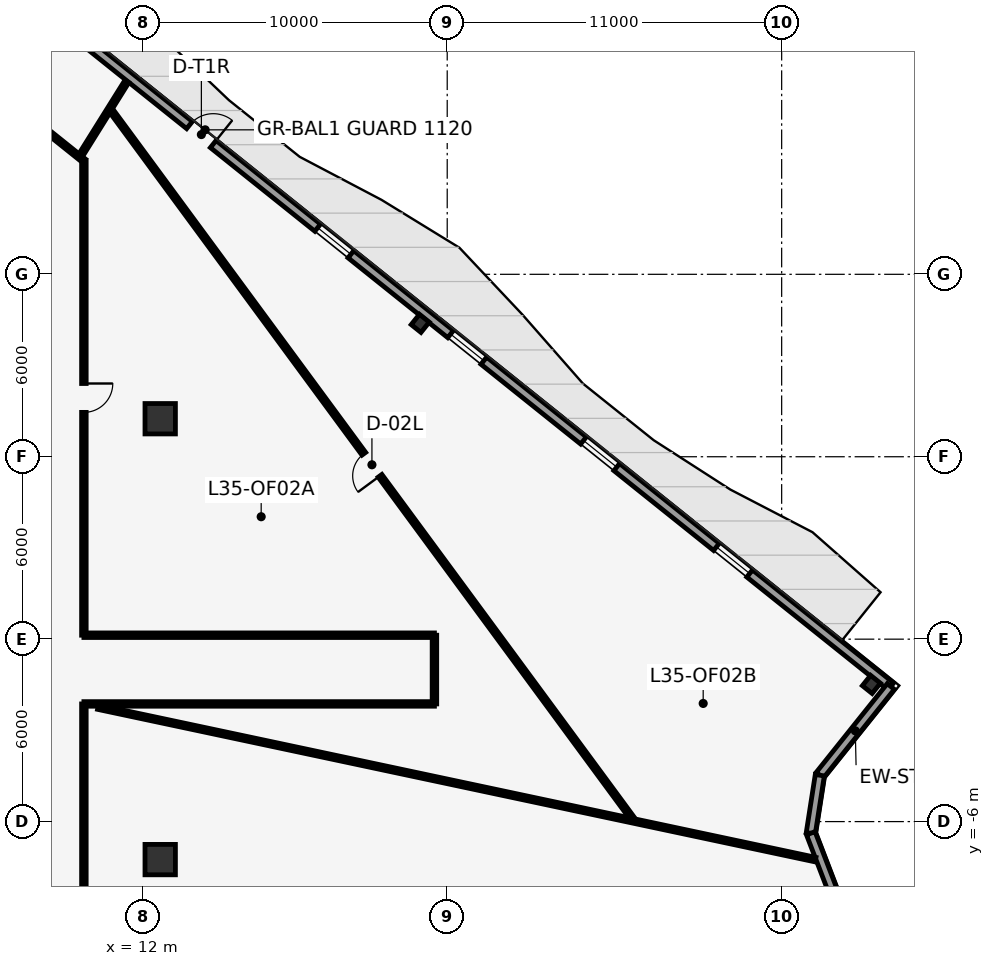
"""IFC4 building model, lengths in metres.
Left out: names, types, materials, properties, quantities, classifications, styles, units other than length and angle.
Written with IfcOpenShell. Run it as: python <this file> out.ifc"""

import sys

from ifc_helpers import new_model, si_unit, direction, frame, frame_2d, origin, origin_2d, place, context, subcontext, project, spatial, rectangle, i_section, extrude, element, fill, save


model = new_model("IFC4")
c1 = context("Model", 3, precision=1e-05, world=origin(), true_north=direction((0.0, 1.0)))
c2 = subcontext(c1, "Body", "Model", "MODEL_VIEW")
j1 = project(units=[si_unit("LENGTHUNIT", "METRE"), si_unit("PLANEANGLEUNIT", "RADIAN")], contexts=[c1])
p1 = place(None, origin())
s1 = spatial("IfcSite", under=j1, at=p1, CompositionType="ELEMENT")
p2 = place(p1, origin())
s2 = spatial("IfcBuilding", under=s1, at=p2, CompositionType="ELEMENT")
p3 = place(p2, frame((0.0, 0.0, 152.7)))
s3 = spatial("IfcBuildingStorey", under=s2, at=p3, CompositionType="ELEMENT", Elevation=152.7)
for number, where, z_axis, x_axis in (
    (1, (12.56, -7.25, 0.0), (0.0, 0.0, 1.0), (1.0, 0.0, 0.0)),
    (2, (12.56, 7.25, 0.0), (0.0, 0.0, 1.0), (1.0, 0.0, 0.0)),
):
    element("IfcColumn", number, at=place(p3, frame(where, z_axis=z_axis, x_axis=x_axis)), inside=s3, PredefinedType="COLUMN", context=c2, shape_type="SweptSolid", body=[
        extrude(rectangle(XDim=1.0, YDim=1.0, at=origin_2d()), origin(), (0.0, 0.0, 1.0), 4.1),
    ])
for number, where, z_axis, x_axis in (
    (3, (35.951, -1.489, 0.0), (0.0, 0.0, 1.0), (-0.781, 0.625, 0.0)),
    (4, (21.112, 10.387, 0.0), (0.0, 0.0, 1.0), (-0.781, 0.625, 0.0)),
):
    element("IfcColumn", number, at=place(p3, frame(where, z_axis=z_axis, x_axis=x_axis)), inside=s3, PredefinedType="COLUMN", context=c2, shape_type="SweptSolid", body=[
        extrude(i_section(OverallWidth=0.411, OverallDepth=0.434, WebThickness=0.036, FlangeThickness=0.057, at=origin_2d()), origin(), (0.0, 0.0, 1.0), 4.1),
    ])
p4 = place(p3, frame((-8.762, 34.748, 0.0), z_axis=(0.0, 0.0, 1.0), x_axis=(0.780669916438, -0.624943582708, 0.0)))
e5 = element("IfcWall", 5, at=p4, inside=s3, PredefinedType="STANDARD", context=c2, shape_type="SweptSolid", body=[
    extrude(rectangle(XDim=58.093, YDim=0.3, at=frame_2d((29.046, 0.0))), origin(), (0.0, 0.0, 1.0), 3.85),
])
p5 = place(p4, frame((28.547, 0.0, 0.0)))
e6 = element("IfcOpeningElement", 6, at=p5, cuts=e5, PredefinedType="OPENING", context=c2, shape_type="SweptSolid", body=[
    extrude(rectangle(XDim=1.0, YDim=2.15, at=frame_2d((0.5, 1.075))), frame((0.0, 0.16, 0.0), z_axis=(0.0, -1.0, 0.0), x_axis=(1.0, 0.0, 0.0)), (0.0, 0.0, 1.0), 0.32),
])
p6 = place(p4, frame((5.947, 0.0, 0.85)))
e7 = element("IfcOpeningElement", 7, at=p6, cuts=e5, PredefinedType="OPENING", context=c2, shape_type="SweptSolid", body=[
    extrude(rectangle(XDim=1.4, YDim=2.2, at=frame_2d((0.7, 1.1))), frame((0.0, 0.16, 0.0), z_axis=(0.0, -1.0, 0.0), x_axis=(1.0, 0.0, 0.0)), (0.0, 0.0, 1.0), 0.32),
])
p7 = place(p4, frame((11.547, 0.0, 0.85)))
e8 = element("IfcOpeningElement", 8, at=p7, cuts=e5, PredefinedType="OPENING", context=c2, shape_type="SweptSolid", body=[
    extrude(rectangle(XDim=1.4, YDim=2.2, at=frame_2d((0.7, 1.1))), frame((0.0, 0.16, 0.0), z_axis=(0.0, -1.0, 0.0), x_axis=(1.0, 0.0, 0.0)), (0.0, 0.0, 1.0), 0.32),
])
p8 = place(p4, frame((17.146, 0.0, 0.85)))
e9 = element("IfcOpeningElement", 9, at=p8, cuts=e5, PredefinedType="OPENING", context=c2, shape_type="SweptSolid", body=[
    extrude(rectangle(XDim=1.4, YDim=2.2, at=frame_2d((0.7, 1.1))), frame((0.0, 0.16, 0.0), z_axis=(0.0, -1.0, 0.0), x_axis=(1.0, 0.0, 0.0)), (0.0, 0.0, 1.0), 0.32),
])
p9 = place(p4, frame((22.747, 0.0, 0.85)))
e10 = element("IfcOpeningElement", 10, at=p9, cuts=e5, PredefinedType="OPENING", context=c2, shape_type="SweptSolid", body=[
    extrude(rectangle(XDim=1.4, YDim=2.2, at=frame_2d((0.7, 1.1))), frame((0.0, 0.16, 0.0), z_axis=(0.0, -1.0, 0.0), x_axis=(1.0, 0.0, 0.0)), (0.0, 0.0, 1.0), 0.32),
])
p10 = place(p4, frame((33.947, 0.0, 0.85)))
e11 = element("IfcOpeningElement", 11, at=p10, cuts=e5, PredefinedType="OPENING", context=c2, shape_type="SweptSolid", body=[
    extrude(rectangle(XDim=1.4, YDim=2.2, at=frame_2d((0.7, 1.1))), frame((0.0, 0.16, 0.0), z_axis=(0.0, -1.0, 0.0), x_axis=(1.0, 0.0, 0.0)), (0.0, 0.0, 1.0), 0.32),
])
p11 = place(p4, frame((39.547, 0.0, 0.85)))
e12 = element("IfcOpeningElement", 12, at=p11, cuts=e5, PredefinedType="OPENING", context=c2, shape_type="SweptSolid", body=[
    extrude(rectangle(XDim=1.4, YDim=2.2, at=frame_2d((0.7, 1.1))), frame((0.0, 0.16, 0.0), z_axis=(0.0, -1.0, 0.0), x_axis=(1.0, 0.0, 0.0)), (0.0, 0.0, 1.0), 0.32),
])
p12 = place(p4, frame((45.146, 0.0, 0.85)))
e13 = element("IfcOpeningElement", 13, at=p12, cuts=e5, PredefinedType="OPENING", context=c2, shape_type="SweptSolid", body=[
    extrude(rectangle(XDim=1.4, YDim=2.2, at=frame_2d((0.7, 1.1))), frame((0.0, 0.16, 0.0), z_axis=(0.0, -1.0, 0.0), x_axis=(1.0, 0.0, 0.0)), (0.0, 0.0, 1.0), 0.32),
])
p13 = place(p4, frame((50.747, 0.0, 0.85)))
e14 = element("IfcOpeningElement", 14, at=p13, cuts=e5, PredefinedType="OPENING", context=c2, shape_type="SweptSolid", body=[
    extrude(rectangle(XDim=1.4, YDim=2.2, at=frame_2d((0.7, 1.1))), frame((0.0, 0.16, 0.0), z_axis=(0.0, -1.0, 0.0), x_axis=(1.0, 0.0, 0.0)), (0.0, 0.0, 1.0), 0.32),
])
p14 = place(p3, frame((36.59, -1.557, 0.0), z_axis=(0.0, 0.0, 1.0), x_axis=(-0.62493402561, -0.780677567012, 0.0)))
e15 = element("IfcWall", 15, at=p14, inside=s3, PredefinedType="STANDARD", context=c2, shape_type="SweptSolid", body=[
    extrude(rectangle(XDim=3.737, YDim=0.3, at=frame_2d((1.869, 0.0))), origin(), (0.0, 0.0, 1.0), 3.85),
])
p15 = place(p3, frame((34.254, -4.474, 0.0), z_axis=(0.0, 0.0, 1.0), x_axis=(-0.153717968475, -0.988114763663, 0.0)))
e16 = element("IfcWall", 16, at=p15, inside=s3, PredefinedType="STANDARD", context=c2, shape_type="SweptSolid", body=[
    extrude(rectangle(XDim=1.933, YDim=0.3, at=frame_2d((0.966, 0.0))), origin(), (0.0, 0.0, 1.0), 3.85),
])
p16 = place(p3, frame((33.957, -6.384, 0.0), z_axis=(0.0, 0.0, 1.0), x_axis=(0.358344201462, -0.933589542186, 0.0)))
e17 = element("IfcWall", 17, at=p16, inside=s3, PredefinedType="STANDARD", context=c2, shape_type="SweptSolid", body=[
    extrude(rectangle(XDim=3.737, YDim=0.3, at=frame_2d((1.869, 0.0))), origin(), (0.0, 0.0, 1.0), 3.85),
])
p17 = place(p3, frame((7.79, 17.547, 0.0), z_axis=(0.0, 0.0, 1.0), x_axis=(0.780646621428, -0.624972681366, 0.0)))
e18 = element("IfcWall", 18, at=p17, inside=s3, PredefinedType="PARTITIONING", context=c2, shape_type="SweptSolid", body=[
    extrude(rectangle(XDim=2.895, YDim=0.15, at=frame_2d((1.448, 0.0))), origin(), (0.0, 0.0, 1.0), 3.85),
])
p18 = place(p3, frame((10.05, 15.737, 0.0), z_axis=(0.0, 0.0, 1.0), x_axis=(0.0, -1.0, 0.0)))
e19 = element("IfcWall", 19, at=p18, inside=s3, PredefinedType="PARTITIONING", context=c2, shape_type="SweptSolid", body=[
    extrude(rectangle(XDim=15.607, YDim=0.15, at=frame_2d((7.804, 0.0))), origin(), (0.0, 0.0, 1.0), 3.85),
])
p19 = place(p18, frame((7.329, 0.0, 0.0)))
e20 = element("IfcOpeningElement", 20, at=p19, cuts=e19, PredefinedType="OPENING", context=c2, shape_type="SweptSolid", body=[
    extrude(rectangle(XDim=0.95, YDim=2.15, at=frame_2d((0.475, 1.075))), frame((0.0, 0.085, 0.0), z_axis=(0.0, -1.0, 0.0), x_axis=(1.0, 0.0, 0.0)), (0.0, 0.0, 1.0), 0.17),
])
p20 = place(p3, frame((10.05, 0.13, 0.0), z_axis=(0.0, 0.0, 1.0), x_axis=(1.0, 0.0, 0.0)))
e21 = element("IfcWall", 21, at=p20, inside=s3, PredefinedType="PARTITIONING", context=c2, shape_type="SweptSolid", body=[
    extrude(rectangle(XDim=11.53, YDim=0.15, at=frame_2d((5.765, 0.0))), origin(), (0.0, 0.0, 1.0), 3.85),
])
p21 = place(p3, frame((21.58, 0.13, 0.0), z_axis=(0.0, 0.0, 1.0), x_axis=(0.0, -1.0, 0.0)))
e22 = element("IfcWall", 22, at=p21, inside=s3, PredefinedType="PARTITIONING", context=c2, shape_type="SweptSolid", body=[
    extrude(rectangle(XDim=2.26, YDim=0.15, at=frame_2d((1.13, 0.0))), origin(), (0.0, 0.0, 1.0), 3.85),
])
p22 = place(p3, frame((21.58, -2.13, 0.0), z_axis=(0.0, 0.0, 1.0), x_axis=(-1.0, 0.0, 0.0)))
e23 = element("IfcWall", 23, at=p22, inside=s3, PredefinedType="PARTITIONING", context=c2, shape_type="SweptSolid", body=[
    extrude(rectangle(XDim=11.53, YDim=0.15, at=frame_2d((5.765, 0.0))), origin(), (0.0, 0.0, 1.0), 3.85),
])
p23 = place(p3, frame((10.05, -2.13, 0.0), z_axis=(0.0, 0.0, 1.0), x_axis=(0.0, -1.0, 0.0)))
e24 = element("IfcWall", 24, at=p23, inside=s3, PredefinedType="PARTITIONING", context=c2, shape_type="SweptSolid", body=[
    extrude(rectangle(XDim=14.13, YDim=0.15, at=frame_2d((7.065, 0.0))), origin(), (0.0, 0.0, 1.0), 3.85),
])
p24 = place(p23, frame((6.59, 0.0, 0.0)))
e25 = element("IfcOpeningElement", 25, at=p24, cuts=e24, PredefinedType="OPENING", context=c2, shape_type="SweptSolid", body=[
    extrude(rectangle(XDim=0.95, YDim=2.15, at=frame_2d((0.475, 1.075))), frame((0.0, 0.085, 0.0), z_axis=(0.0, -1.0, 0.0), x_axis=(1.0, 0.0, 0.0)), (0.0, 0.0, 1.0), 0.17),
])
p25 = place(p3, frame((9.962, 15.942, 0.0), z_axis=(0.0, 0.0, 1.0), x_axis=(0.529929252451, 0.848041854743, 0.0)))
e26 = element("IfcWall", 26, at=p25, inside=s3, PredefinedType="PARTITIONING", context=c2, shape_type="SweptSolid", body=[
    extrude(rectangle(XDim=2.834, YDim=0.15, at=frame_2d((1.417, 0.0))), origin(), (0.0, 0.0, 1.0), 3.85),
])
p26 = place(p3, frame((10.515, -2.235, 0.0), z_axis=(0.0, 0.0, 1.0), x_axis=(0.978148639384, -0.207906804293, 0.0)))
e27 = element("IfcWall", 27, at=p26, inside=s3, PredefinedType="PARTITIONING", context=c2, shape_type="SweptSolid", body=[
    extrude(rectangle(XDim=24.125, YDim=0.15, at=frame_2d((12.063, 0.0))), origin(), (0.0, 0.0, 1.0), 3.85),
])
p27 = place(p3, frame((28.13, -5.954, 0.0), z_axis=(0.0, 0.0, 1.0), x_axis=(-0.592900374234, 0.805275819973, 0.0)))
e28 = element("IfcWall", 28, at=p27, inside=s3, PredefinedType="PARTITIONING", context=c2, shape_type="SweptSolid", body=[
    extrude(rectangle(XDim=29.031, YDim=0.15, at=frame_2d((14.516, 0.0))), origin(), (0.0, 0.0, 1.0), 3.85),
])
p28 = place(p27, frame((14.066, 0.0, 0.0)))
e29 = element("IfcOpeningElement", 29, at=p28, cuts=e28, PredefinedType="OPENING", context=c2, shape_type="SweptSolid", body=[
    extrude(rectangle(XDim=0.9, YDim=2.1, at=frame_2d((0.45, 1.05))), frame((0.0, 0.085, 0.0), z_axis=(0.0, -1.0, 0.0), x_axis=(1.0, 0.0, 0.0)), (0.0, 0.0, 1.0), 0.17),
])
p29 = place(p5, origin())
e30 = element("IfcDoor", 30, at=p29, inside=s3, OperationType="SINGLE_SWING_RIGHT", PredefinedType="DOOR", context=c2, shape_type="SweptSolid", body=[
    extrude(rectangle(XDim=1.0, YDim=2.15, at=frame_2d((0.5, 1.075))), frame((0.0, 0.025, 0.0), z_axis=(0.0, -1.0, 0.0), x_axis=(1.0, 0.0, 0.0)), (0.0, 0.0, 1.0), 0.05),
])
fill(e6, e30)
p30 = place(p10, origin())
e31 = element("IfcWindow", 31, at=p30, inside=s3, PartitioningType="SINGLE_PANEL", PredefinedType="WINDOW", context=c2, shape_type="SweptSolid", body=[
    extrude(rectangle(XDim=1.4, YDim=2.2, at=frame_2d((0.7, 1.1))), frame((0.0, 0.03, 0.0), z_axis=(0.0, -1.0, 0.0), x_axis=(1.0, 0.0, 0.0)), (0.0, 0.0, 1.0), 0.06),
])
fill(e11, e31)
p31 = place(p11, origin())
e32 = element("IfcWindow", 32, at=p31, inside=s3, PartitioningType="SINGLE_PANEL", PredefinedType="WINDOW", context=c2, shape_type="SweptSolid", body=[
    extrude(rectangle(XDim=1.4, YDim=2.2, at=frame_2d((0.7, 1.1))), frame((0.0, 0.03, 0.0), z_axis=(0.0, -1.0, 0.0), x_axis=(1.0, 0.0, 0.0)), (0.0, 0.0, 1.0), 0.06),
])
fill(e12, e32)
p32 = place(p12, origin())
e33 = element("IfcWindow", 33, at=p32, inside=s3, PartitioningType="SINGLE_PANEL", PredefinedType="WINDOW", context=c2, shape_type="SweptSolid", body=[
    extrude(rectangle(XDim=1.4, YDim=2.2, at=frame_2d((0.7, 1.1))), frame((0.0, 0.03, 0.0), z_axis=(0.0, -1.0, 0.0), x_axis=(1.0, 0.0, 0.0)), (0.0, 0.0, 1.0), 0.06),
])
fill(e13, e33)
p33 = place(p13, origin())
e34 = element("IfcWindow", 34, at=p33, inside=s3, PartitioningType="SINGLE_PANEL", PredefinedType="WINDOW", context=c2, shape_type="SweptSolid", body=[
    extrude(rectangle(XDim=1.4, YDim=2.2, at=frame_2d((0.7, 1.1))), frame((0.0, 0.03, 0.0), z_axis=(0.0, -1.0, 0.0), x_axis=(1.0, 0.0, 0.0)), (0.0, 0.0, 1.0), 0.06),
])
fill(e14, e34)
p34 = place(p28, origin())
e35 = element("IfcDoor", 35, at=p34, inside=s3, OperationType="SINGLE_SWING_LEFT", PredefinedType="DOOR", context=c2, shape_type="SweptSolid", body=[
    extrude(rectangle(XDim=0.9, YDim=2.1, at=frame_2d((0.45, 1.05))), frame((0.0, 0.025, 0.0), z_axis=(0.0, -1.0, 0.0), x_axis=(1.0, 0.0, 0.0)), (0.0, 0.0, 1.0), 0.05),
])
fill(e29, e35)
p35 = place(p19, origin())
e36 = element("IfcDoor", 36, at=p35, inside=s3, OperationType="SINGLE_SWING_LEFT", PredefinedType="DOOR", context=c2, shape_type="SweptSolid", body=[
    extrude(rectangle(XDim=0.95, YDim=2.15, at=frame_2d((0.475, 1.075))), frame((0.0, 0.025, 0.0), z_axis=(0.0, -1.0, 0.0), x_axis=(1.0, 0.0, 0.0)), (0.0, 0.0, 1.0), 0.05),
])
fill(e20, e36)
save(model, sys.argv[1])
